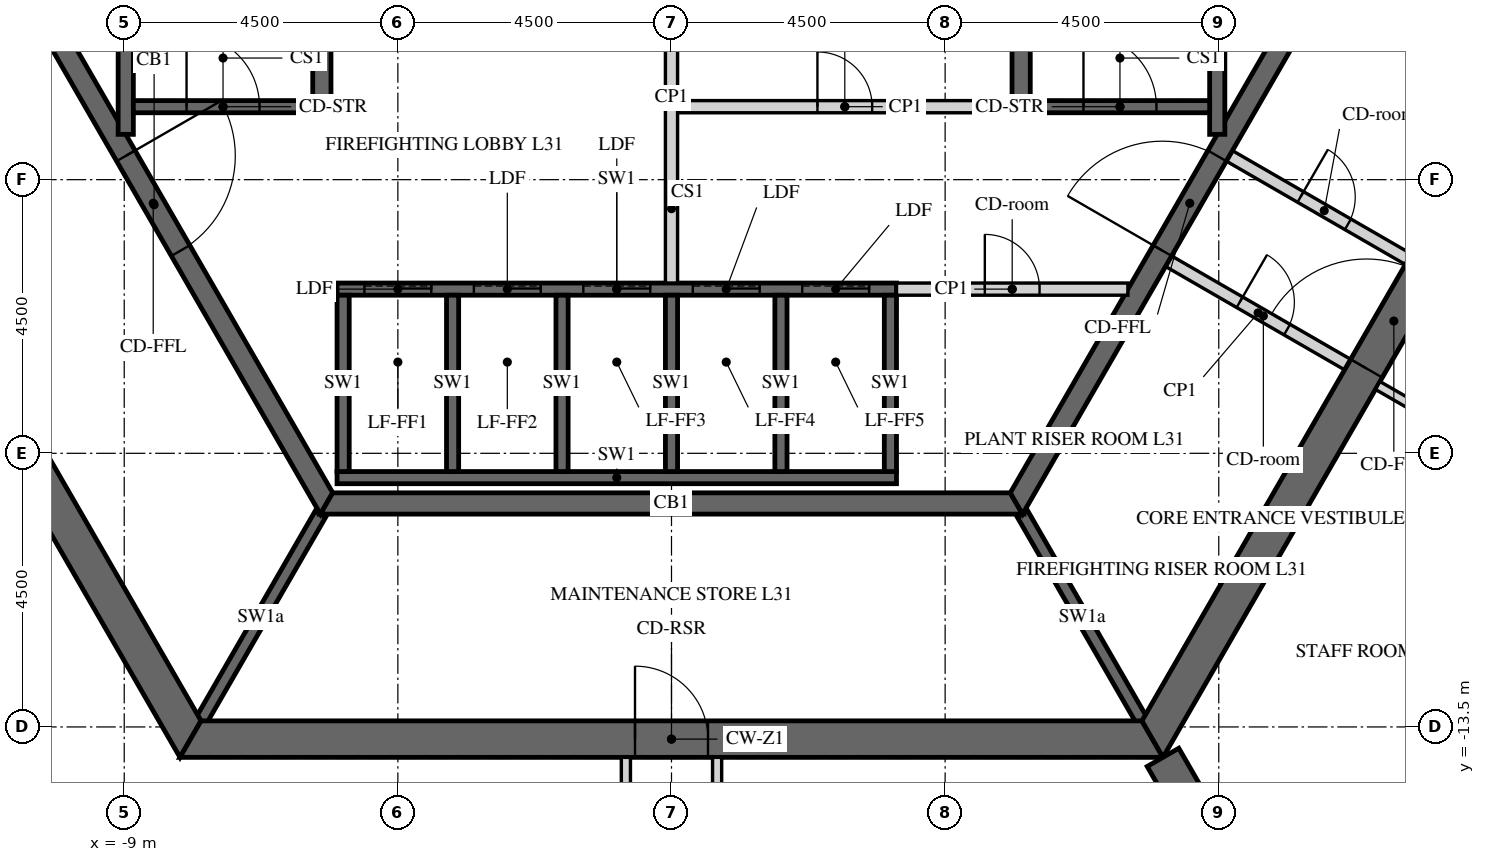
"""IFC4 building model, lengths in metres.
Left out: names, types, materials, properties, quantities, classifications, styles, units other than length and angle.
Written with IfcOpenShell. Run it as: python <this file> out.ifc"""

import sys

from ifc_helpers import new_model, si_unit, direction, frame, frame_2d, origin, place, context, subcontext, project, spatial, polyline, rectangle, outline, extrude, element, fill, save


model = new_model("IFC4")
c1 = context("Model", 3, precision=1e-05, world=origin(), true_north=direction((0.0, 1.0)))
c2 = subcontext(c1, "Body", "Model", "MODEL_VIEW")
j1 = project(units=[si_unit("LENGTHUNIT", "METRE"), si_unit("PLANEANGLEUNIT", "RADIAN")], contexts=[c1])
p1 = place(None, origin())
s1 = spatial("IfcSite", under=j1, at=p1, CompositionType="ELEMENT")
p2 = place(p1, origin())
s2 = spatial("IfcBuilding", under=s1, at=p2, CompositionType="ELEMENT")
p3 = place(p2, frame((0.0, 0.0, 135.0)))
s3 = spatial("IfcBuildingStorey", under=s2, at=p3, CompositionType="ELEMENT", Elevation=135.0)
p4 = place(p3, frame((-15.819, 0.0, -0.15), z_axis=(0.0, 0.0, 1.0), x_axis=(0.499999880136, -0.866025472988, 0.0)))
e1 = element("IfcWall", 1, at=p4, inside=s3, PredefinedType="SHEAR", context=c2, shape_type="SweptSolid", body=[
    extrude(outline(polyline([(-0.173, -0.3), (15.993, -0.3), (15.646, 0.3), (0.173, 0.3), (-0.173, -0.3)])), origin(), (0.0, 0.0, 1.0), 3.9),
])
p5 = place(p4, frame((6.981, 0.0, 0.15)))
e2 = element("IfcOpeningElement", 2, at=p5, cuts=e1, PredefinedType="OPENING", context=c2, shape_type="SweptSolid", body=[
    extrude(rectangle(XDim=1.8, YDim=2.4, at=frame_2d((0.9, 1.2))), frame((0.0, 0.31, 0.0), z_axis=(0.0, -1.0, 0.0), x_axis=(1.0, 0.0, 0.0)), (0.0, 0.0, 1.0), 0.62),
])
p6 = place(p3, frame((-7.91, -13.7, -0.15), z_axis=(0.0, 0.0, 1.0), x_axis=(1.0, 0.0, 0.0)))
e3 = element("IfcWall", 3, at=p6, inside=s3, PredefinedType="SHEAR", context=c2, shape_type="SweptSolid", body=[
    extrude(outline(polyline([(-0.173, -0.3), (15.993, -0.3), (15.646, 0.3), (0.173, 0.3), (-0.173, -0.3)])), origin(), (0.0, 0.0, 1.0), 3.9),
])
p7 = place(p6, frame((7.31, 0.0, 0.15)))
e4 = element("IfcOpeningElement", 4, at=p7, cuts=e3, PredefinedType="OPENING", context=c2, shape_type="SweptSolid", body=[
    extrude(rectangle(XDim=1.2, YDim=2.4, at=frame_2d((0.6, 1.2))), frame((0.0, 0.31, 0.0), z_axis=(0.0, -1.0, 0.0), x_axis=(1.0, 0.0, 0.0)), (0.0, 0.0, 1.0), 0.62),
])
p8 = place(p3, frame((7.91, -13.7, -0.15), z_axis=(0.0, 0.0, 1.0), x_axis=(0.499999880136, 0.866025472988, 0.0)))
e5 = element("IfcWall", 5, at=p8, inside=s3, PredefinedType="SHEAR", context=c2, shape_type="SweptSolid", body=[
    extrude(outline(polyline([(-0.173, -0.3), (15.993, -0.3), (15.646, 0.3), (0.173, 0.3), (-0.173, -0.3)])), origin(), (0.0, 0.0, 1.0), 3.9),
])
p9 = place(p8, frame((7.039, 0.0, 0.15)))
e6 = element("IfcOpeningElement", 6, at=p9, cuts=e5, PredefinedType="OPENING", context=c2, shape_type="SweptSolid", body=[
    extrude(rectangle(XDim=1.8, YDim=2.4, at=frame_2d((0.9, 1.2))), frame((0.0, 0.31, 0.0), z_axis=(0.0, -1.0, 0.0), x_axis=(1.0, 0.0, 0.0)), (0.0, 0.0, 1.0), 0.62),
])
p10 = place(p3, frame((8.083, -14.0, -0.15), z_axis=(0.0, 0.0, 1.0), x_axis=(0.499997680643, -0.866026742862, 0.0)))
e7 = element("IfcWall", 7, at=p10, inside=s3, PredefinedType="SHEAR", context=c2, shape_type="SweptSolid", body=[
    extrude(rectangle(XDim=16.509, YDim=0.6, at=frame_2d((8.254, 0.0))), origin(), (0.0, 0.0, 1.0), 3.9),
])
p11 = place(p10, frame((7.354, 0.0, 0.15)))
e8 = element("IfcOpeningElement", 8, at=p11, cuts=e7, PredefinedType="OPENING", context=c2, shape_type="SweptSolid", body=[
    extrude(rectangle(XDim=1.8, YDim=2.4, at=frame_2d((0.9, 1.2))), frame((0.0, 0.31, 0.0), z_axis=(0.0, -1.0, 0.0), x_axis=(1.0, 0.0, 0.0)), (0.0, 0.0, 1.0), 0.62),
])
p12 = place(p3, frame((-11.345, 0.0, -0.15), z_axis=(0.0, 0.0, 1.0), x_axis=(0.499995046907, -0.866028263435, 0.0)))
e9 = element("IfcWall", 9, at=p12, inside=s3, PredefinedType="SHEAR", context=c2, shape_type="SweptSolid", body=[
    extrude(outline(polyline([(-0.101, -0.175), (11.446, -0.175), (11.244, 0.175), (0.101, 0.175), (-0.101, -0.175)])), origin(), (0.0, 0.0, 1.0), 3.9),
])
p13 = place(p12, frame((4.744, 0.0, 0.15)))
e10 = element("IfcOpeningElement", 10, at=p13, cuts=e9, PredefinedType="OPENING", context=c2, shape_type="SweptSolid", body=[
    extrude(rectangle(XDim=1.8, YDim=2.4, at=frame_2d((0.9, 1.2))), frame((0.0, 0.185, 0.0), z_axis=(0.0, -1.0, 0.0), x_axis=(1.0, 0.0, 0.0)), (0.0, 0.0, 1.0), 0.37),
])
p14 = place(p3, frame((-5.673, -9.825, -0.15), z_axis=(0.0, 0.0, 1.0), x_axis=(1.0, 0.0, 0.0)))
e11 = element("IfcWall", 11, at=p14, inside=s3, PredefinedType="SHEAR", context=c2, shape_type="SweptSolid", body=[
    extrude(outline(polyline([(-0.101, -0.175), (11.446, -0.175), (11.244, 0.175), (0.101, 0.175), (-0.101, -0.175)])), origin(), (0.0, 0.0, 1.0), 3.9),
])
p15 = place(p3, frame((5.673, -9.825, -0.15), z_axis=(0.0, 0.0, 1.0), x_axis=(0.499995046907, 0.866028263435, 0.0)))
e12 = element("IfcWall", 12, at=p15, inside=s3, PredefinedType="SHEAR", context=c2, shape_type="SweptSolid", body=[
    extrude(outline(polyline([(-0.101, -0.175), (11.446, -0.175), (11.244, 0.175), (0.101, 0.175), (-0.101, -0.175)])), origin(), (0.0, 0.0, 1.0), 3.9),
])
p16 = place(p15, frame((4.801, 0.0, 0.15)))
e13 = element("IfcOpeningElement", 13, at=p16, cuts=e12, PredefinedType="OPENING", context=c2, shape_type="SweptSolid", body=[
    extrude(rectangle(XDim=1.8, YDim=2.4, at=frame_2d((0.9, 1.2))), frame((0.0, 0.185, 0.0), z_axis=(0.0, -1.0, 0.0), x_axis=(1.0, 0.0, 0.0)), (0.0, 0.0, 1.0), 0.37),
])
p17 = place(p3, frame((-5.5, -6.3, -0.25), z_axis=(0.0, 0.0, 1.0), x_axis=(1.0, 0.0, 0.0)))
e14 = element("IfcWall", 14, at=p17, inside=s3, PredefinedType="SHEAR", context=c2, shape_type="SweptSolid", body=[
    extrude(rectangle(XDim=9.2, YDim=0.2, at=frame_2d((4.6, 0.0))), origin(), (0.0, 0.0, 1.0), 3.9),
])
p18 = place(p17, frame((0.45, 0.0, 0.25)))
e15 = element("IfcOpeningElement", 15, at=p18, cuts=e14, PredefinedType="OPENING", context=c2, shape_type="SweptSolid", body=[
    extrude(rectangle(XDim=1.1, YDim=2.1, at=frame_2d((0.55, 1.05))), frame((0.0, 0.11, 0.0), z_axis=(0.0, -1.0, 0.0), x_axis=(1.0, 0.0, 0.0)), (0.0, 0.0, 1.0), 0.22),
])
p19 = place(p17, frame((2.25, 0.0, 0.25)))
e16 = element("IfcOpeningElement", 16, at=p19, cuts=e14, PredefinedType="OPENING", context=c2, shape_type="SweptSolid", body=[
    extrude(rectangle(XDim=1.1, YDim=2.1, at=frame_2d((0.55, 1.05))), frame((0.0, 0.11, 0.0), z_axis=(0.0, -1.0, 0.0), x_axis=(1.0, 0.0, 0.0)), (0.0, 0.0, 1.0), 0.22),
])
p20 = place(p17, frame((4.05, 0.0, 0.25)))
e17 = element("IfcOpeningElement", 17, at=p20, cuts=e14, PredefinedType="OPENING", context=c2, shape_type="SweptSolid", body=[
    extrude(rectangle(XDim=1.1, YDim=2.1, at=frame_2d((0.55, 1.05))), frame((0.0, 0.11, 0.0), z_axis=(0.0, -1.0, 0.0), x_axis=(1.0, 0.0, 0.0)), (0.0, 0.0, 1.0), 0.22),
])
p21 = place(p17, frame((5.85, 0.0, 0.25)))
e18 = element("IfcOpeningElement", 18, at=p21, cuts=e14, PredefinedType="OPENING", context=c2, shape_type="SweptSolid", body=[
    extrude(rectangle(XDim=1.1, YDim=2.1, at=frame_2d((0.55, 1.05))), frame((0.0, 0.11, 0.0), z_axis=(0.0, -1.0, 0.0), x_axis=(1.0, 0.0, 0.0)), (0.0, 0.0, 1.0), 0.22),
])
p22 = place(p17, frame((7.65, 0.0, 0.25)))
e19 = element("IfcOpeningElement", 19, at=p22, cuts=e14, PredefinedType="OPENING", context=c2, shape_type="SweptSolid", body=[
    extrude(rectangle(XDim=1.1, YDim=2.1, at=frame_2d((0.55, 1.05))), frame((0.0, 0.11, 0.0), z_axis=(0.0, -1.0, 0.0), x_axis=(1.0, 0.0, 0.0)), (0.0, 0.0, 1.0), 0.22),
])
p23 = place(p3, frame((-5.5, -9.4, -0.25), z_axis=(0.0, 0.0, 1.0), x_axis=(1.0, 0.0, 0.0)))
e20 = element("IfcWall", 20, at=p23, inside=s3, PredefinedType="SHEAR", context=c2, shape_type="SweptSolid", body=[
    extrude(rectangle(XDim=9.2, YDim=0.2, at=frame_2d((4.6, 0.0))), origin(), (0.0, 0.0, 1.0), 3.9),
])
for number, where, z_axis, x_axis in (
    (21, (-5.4, -9.3, -0.25), (0.0, 0.0, 1.0), (0.0, 1.0, 0.0)),
    (22, (-3.6, -9.3, -0.25), (0.0, 0.0, 1.0), (0.0, 1.0, 0.0)),
    (23, (-1.8, -9.3, -0.25), (0.0, 0.0, 1.0), (0.0, 1.0, 0.0)),
    (24, (0.0, -9.3, -0.25), (0.0, 0.0, 1.0), (0.0, 1.0, 0.0)),
    (25, (1.8, -9.3, -0.25), (0.0, 0.0, 1.0), (0.0, 1.0, 0.0)),
    (26, (3.6, -9.3, -0.25), (0.0, 0.0, 1.0), (0.0, 1.0, 0.0)),
):
    element("IfcWall", number, at=place(p3, frame(where, z_axis=z_axis, x_axis=x_axis)), inside=s3, PredefinedType="SHEAR", context=c2, shape_type="SweptSolid", body=[
        extrude(rectangle(XDim=2.9, YDim=0.2, at=frame_2d((1.45, 0.0))), origin(), (0.0, 0.0, 1.0), 3.9),
    ])
p24 = place(p3, frame((0.1, -3.3, 0.0), z_axis=(0.0, 0.0, 1.0), x_axis=(1.0, 0.0, 0.0)))
e27 = element("IfcWall", 27, at=p24, inside=s3, PredefinedType="PARTITIONING", context=c2, shape_type="SweptSolid", body=[
    extrude(rectangle(XDim=5.5, YDim=0.2, at=frame_2d((2.75, 0.0))), origin(), (0.0, 0.0, 1.0), 3.65),
])
p25 = place(p24, frame((2.3, 0.0, 0.0)))
e28 = element("IfcOpeningElement", 28, at=p25, cuts=e27, PredefinedType="OPENING", context=c2, shape_type="SweptSolid", body=[
    extrude(rectangle(XDim=0.9, YDim=2.1, at=frame_2d((0.45, 1.05))), frame((0.0, 0.11, 0.0), z_axis=(0.0, -1.0, 0.0), x_axis=(1.0, 0.0, 0.0)), (0.0, 0.0, 1.0), 0.22),
])
p26 = place(p3, frame((0.0, -6.2, 0.0), z_axis=(0.0, 0.0, 1.0), x_axis=(0.0, 1.0, 0.0)))
e29 = element("IfcWall", 29, at=p26, inside=s3, PredefinedType="PARTITIONING", context=c2, shape_type="SweptSolid", body=[
    extrude(rectangle(XDim=6.1, YDim=0.2, at=frame_2d((3.05, 0.0))), origin(), (0.0, 0.0, 1.0), 3.65),
])
p27 = place(p3, frame((3.7, -6.3, 0.0), z_axis=(0.0, 0.0, 1.0), x_axis=(1.0, 0.0, 0.0)))
e30 = element("IfcWall", 30, at=p27, inside=s3, PredefinedType="PARTITIONING", context=c2, shape_type="SweptSolid", body=[
    extrude(rectangle(XDim=3.806, YDim=0.2, at=frame_2d((1.903, 0.0))), origin(), (0.0, 0.0, 1.0), 3.65),
])
p28 = place(p27, frame((1.453, 0.0, 0.0)))
e31 = element("IfcOpeningElement", 31, at=p28, cuts=e30, PredefinedType="OPENING", context=c2, shape_type="SweptSolid", body=[
    extrude(rectangle(XDim=0.9, YDim=2.1, at=frame_2d((0.45, 1.05))), frame((0.0, 0.11, 0.0), z_axis=(0.0, -1.0, 0.0), x_axis=(1.0, 0.0, 0.0)), (0.0, 0.0, 1.0), 0.22),
])
for number, where, z_axis, x_axis in (
    (32, (-5.773, -10.0, -0.15), (0.0, 0.0, 1.0), (-0.5, -0.866, 0.0)),
    (33, (5.773, -10.0, -0.15), (0.0, 0.0, 1.0), (0.5, -0.866, 0.0)),
):
    element("IfcWall", number, at=place(p3, frame(where, z_axis=z_axis, x_axis=x_axis)), inside=s3, PredefinedType="SHEAR", context=c2, shape_type="SweptSolid", body=[
        extrude(rectangle(XDim=3.926, YDim=0.2, at=frame_2d((1.963, 0.0))), origin(), (0.0, 0.0, 1.0), 3.9),
    ])
p29 = place(p3, frame((9.175, -4.109, 0.0), z_axis=(0.0, 0.0, 1.0), x_axis=(0.865989465428, -0.500062241894, 0.0)))
e34 = element("IfcWall", 34, at=p29, inside=s3, PredefinedType="PARTITIONING", context=c2, shape_type="SweptSolid", body=[
    extrude(rectangle(XDim=3.4, YDim=0.2, at=frame_2d((1.7, 0.0))), origin(), (0.0, 0.0, 1.0), 3.65),
])
p30 = place(p29, frame((1.351, 0.0, 0.0)))
e35 = element("IfcOpeningElement", 35, at=p30, cuts=e34, PredefinedType="OPENING", context=c2, shape_type="SweptSolid", body=[
    extrude(rectangle(XDim=0.9, YDim=2.1, at=frame_2d((0.45, 1.05))), frame((0.0, 0.11, 0.0), z_axis=(0.0, -1.0, 0.0), x_axis=(1.0, 0.0, 0.0)), (0.0, 0.0, 1.0), 0.22),
])
p31 = place(p3, frame((8.175, -5.841, 0.0), z_axis=(0.0, 0.0, 1.0), x_axis=(0.866020560687, -0.500008388397, 0.0)))
e36 = element("IfcWall", 36, at=p31, inside=s3, PredefinedType="PARTITIONING", context=c2, shape_type="SweptSolid", body=[
    extrude(rectangle(XDim=3.4, YDim=0.2, at=frame_2d((1.7, 0.0))), origin(), (0.0, 0.0, 1.0), 3.65),
])
p32 = place(p31, frame((1.35, 0.0, 0.0)))
e37 = element("IfcOpeningElement", 37, at=p32, cuts=e36, PredefinedType="OPENING", context=c2, shape_type="SweptSolid", body=[
    extrude(rectangle(XDim=0.9, YDim=2.1, at=frame_2d((0.45, 1.05))), frame((0.0, 0.11, 0.0), z_axis=(0.0, -1.0, 0.0), x_axis=(1.0, 0.0, 0.0)), (0.0, 0.0, 1.0), 0.22),
])
p33 = place(p3, frame((5.75, -3.4, -0.25), z_axis=(0.0, 0.0, 1.0), x_axis=(0.0, 1.0, 0.0)))
e38 = element("IfcWall", 38, at=p33, inside=s3, PredefinedType="SHEAR", context=c2, shape_type="SweptSolid", body=[
    extrude(rectangle(XDim=6.8, YDim=0.3, at=frame_2d((3.4, 0.0))), origin(), (0.0, 0.0, 1.0), 3.9),
])
p34 = place(p3, frame((8.975, -3.755, -0.25), z_axis=(0.0, 0.0, 1.0), x_axis=(0.0, 1.0, 0.0)))
e39 = element("IfcWall", 39, at=p34, inside=s3, PredefinedType="SHEAR", context=c2, shape_type="SweptSolid", body=[
    extrude(rectangle(XDim=7.51, YDim=0.25, at=frame_2d((3.755, 0.0))), origin(), (0.0, 0.0, 1.0), 3.9),
])
p35 = place(p3, frame((5.9, -3.3, -0.25), z_axis=(0.0, 0.0, 1.0), x_axis=(1.0, 0.0, 0.0)))
e40 = element("IfcWall", 40, at=p35, inside=s3, PredefinedType="SHEAR", context=c2, shape_type="SweptSolid", body=[
    extrude(rectangle(XDim=2.95, YDim=0.2, at=frame_2d((1.475, 0.0))), origin(), (0.0, 0.0, 1.0), 3.9),
])
p36 = place(p35, frame((0.875, 0.0, 0.25)))
e41 = element("IfcOpeningElement", 41, at=p36, cuts=e40, PredefinedType="OPENING", context=c2, shape_type="SweptSolid", body=[
    extrude(rectangle(XDim=1.2, YDim=2.4, at=frame_2d((0.6, 1.2))), frame((0.0, 0.11, 0.0), z_axis=(0.0, -1.0, 0.0), x_axis=(1.0, 0.0, 0.0)), (0.0, 0.0, 1.0), 0.22),
])
p37 = place(p3, frame((-5.75, -3.4, -0.25), z_axis=(0.0, 0.0, 1.0), x_axis=(0.0, 1.0, 0.0)))
e42 = element("IfcWall", 42, at=p37, inside=s3, PredefinedType="SHEAR", context=c2, shape_type="SweptSolid", body=[
    extrude(rectangle(XDim=6.8, YDim=0.3, at=frame_2d((3.4, 0.0))), origin(), (0.0, 0.0, 1.0), 3.9),
])
p38 = place(p3, frame((-8.975, -3.755, -0.25), z_axis=(0.0, 0.0, 1.0), x_axis=(0.0, 1.0, 0.0)))
e43 = element("IfcWall", 43, at=p38, inside=s3, PredefinedType="SHEAR", context=c2, shape_type="SweptSolid", body=[
    extrude(rectangle(XDim=7.51, YDim=0.25, at=frame_2d((3.755, 0.0))), origin(), (0.0, 0.0, 1.0), 3.9),
])
p39 = place(p3, frame((-8.85, -3.3, -0.25), z_axis=(0.0, 0.0, 1.0), x_axis=(1.0, 0.0, 0.0)))
e44 = element("IfcWall", 44, at=p39, inside=s3, PredefinedType="SHEAR", context=c2, shape_type="SweptSolid", body=[
    extrude(rectangle(XDim=2.95, YDim=0.2, at=frame_2d((1.475, 0.0))), origin(), (0.0, 0.0, 1.0), 3.9),
])
p40 = place(p39, frame((0.875, 0.0, 0.25)))
e45 = element("IfcOpeningElement", 45, at=p40, cuts=e44, PredefinedType="OPENING", context=c2, shape_type="SweptSolid", body=[
    extrude(rectangle(XDim=1.2, YDim=2.4, at=frame_2d((0.6, 1.2))), frame((0.0, 0.11, 0.0), z_axis=(0.0, -1.0, 0.0), x_axis=(1.0, 0.0, 0.0)), (0.0, 0.0, 1.0), 0.22),
])
p41 = place(p3, frame((-0.75, -14.0, 0.0), z_axis=(0.0, 0.0, 1.0), x_axis=(0.0, -1.0, 0.0)))
e46 = element("IfcWall", 46, at=p41, inside=s3, PredefinedType="PARTITIONING", context=c2, shape_type="SweptSolid", body=[
    extrude(rectangle(XDim=5.951, YDim=0.15, at=frame_2d((2.976, 0.0))), origin(), (0.0, 0.0, 1.0), 2.838),
])
p42 = place(p3, frame((0.75, -19.771, 0.0), z_axis=(0.0, 0.0, 1.0), x_axis=(0.0, 1.0, 0.0)))
e47 = element("IfcWall", 47, at=p42, inside=s3, PredefinedType="PARTITIONING", context=c2, shape_type="SweptSolid", body=[
    extrude(rectangle(XDim=5.771, YDim=0.15, at=frame_2d((2.885, 0.0))), origin(), (0.0, 0.0, 1.0), 2.838),
])
p43 = place(p3, frame((11.614, -7.884, 0.0), z_axis=(0.0, 0.0, 1.0), x_axis=(0.866018092707, -0.500012662943, 0.0)))
e48 = element("IfcWall", 48, at=p43, inside=s3, PredefinedType="PARTITIONING", context=c2, shape_type="SweptSolid", body=[
    extrude(rectangle(XDim=5.85, YDim=0.15, at=frame_2d((2.925, 0.0))), origin(), (0.0, 0.0, 1.0), 2.838),
])
p44 = place(p9, origin())
e49 = element("IfcDoor", 49, at=p44, inside=s3, OperationType="DOUBLE_DOOR_SINGLE_SWING", PredefinedType="DOOR", context=c2, shape_type="SweptSolid", body=[
    extrude(rectangle(XDim=1.8, YDim=2.4, at=frame_2d((0.9, 1.2))), frame((0.0, 0.025, 0.0), z_axis=(0.0, -1.0, 0.0), x_axis=(1.0, 0.0, 0.0)), (0.0, 0.0, 1.0), 0.05),
])
fill(e6, e49)
p45 = place(p7, origin())
e50 = element("IfcDoor", 50, at=p45, inside=s3, OperationType="SINGLE_SWING_LEFT", PredefinedType="DOOR", context=c2, shape_type="SweptSolid", body=[
    extrude(rectangle(XDim=1.2, YDim=2.4, at=frame_2d((0.6, 1.2))), frame((0.0, 0.025, 0.0), z_axis=(0.0, -1.0, 0.0), x_axis=(1.0, 0.0, 0.0)), (0.0, 0.0, 1.0), 0.05),
])
fill(e4, e50)
p46 = place(p13, origin())
e51 = element("IfcDoor", 51, at=p46, inside=s3, OperationType="DOUBLE_DOOR_SINGLE_SWING", PredefinedType="DOOR", context=c2, shape_type="SweptSolid", body=[
    extrude(rectangle(XDim=1.8, YDim=2.4, at=frame_2d((0.9, 1.2))), frame((0.0, 0.025, 0.0), z_axis=(0.0, -1.0, 0.0), x_axis=(1.0, 0.0, 0.0)), (0.0, 0.0, 1.0), 0.05),
])
fill(e10, e51)
p47 = place(p16, origin())
e52 = element("IfcDoor", 52, at=p47, inside=s3, OperationType="DOUBLE_DOOR_SINGLE_SWING", PredefinedType="DOOR", context=c2, shape_type="SweptSolid", body=[
    extrude(rectangle(XDim=1.8, YDim=2.4, at=frame_2d((0.9, 1.2))), frame((0.0, 0.025, 0.0), z_axis=(0.0, -1.0, 0.0), x_axis=(1.0, 0.0, 0.0)), (0.0, 0.0, 1.0), 0.05),
])
fill(e13, e52)
p48 = place(p25, origin())
e53 = element("IfcDoor", 53, at=p48, inside=s3, OperationType="SINGLE_SWING_LEFT", PredefinedType="DOOR", context=c2, shape_type="SweptSolid", body=[
    extrude(rectangle(XDim=0.9, YDim=2.1, at=frame_2d((0.45, 1.05))), frame((0.0, 0.025, 0.0), z_axis=(0.0, -1.0, 0.0), x_axis=(1.0, 0.0, 0.0)), (0.0, 0.0, 1.0), 0.05),
])
fill(e28, e53)
p49 = place(p28, origin())
e54 = element("IfcDoor", 54, at=p49, inside=s3, OperationType="SINGLE_SWING_LEFT", PredefinedType="DOOR", context=c2, shape_type="SweptSolid", body=[
    extrude(rectangle(XDim=0.9, YDim=2.1, at=frame_2d((0.45, 1.05))), frame((0.0, 0.025, 0.0), z_axis=(0.0, -1.0, 0.0), x_axis=(1.0, 0.0, 0.0)), (0.0, 0.0, 1.0), 0.05),
])
fill(e31, e54)
p50 = place(p30, origin())
e55 = element("IfcDoor", 55, at=p50, inside=s3, OperationType="SINGLE_SWING_LEFT", PredefinedType="DOOR", context=c2, shape_type="SweptSolid", body=[
    extrude(rectangle(XDim=0.9, YDim=2.1, at=frame_2d((0.45, 1.05))), frame((0.0, 0.025, 0.0), z_axis=(0.0, -1.0, 0.0), x_axis=(1.0, 0.0, 0.0)), (0.0, 0.0, 1.0), 0.05),
])
fill(e35, e55)
p51 = place(p32, origin())
e56 = element("IfcDoor", 56, at=p51, inside=s3, OperationType="SINGLE_SWING_LEFT", PredefinedType="DOOR", context=c2, shape_type="SweptSolid", body=[
    extrude(rectangle(XDim=0.9, YDim=2.1, at=frame_2d((0.45, 1.05))), frame((0.0, 0.025, 0.0), z_axis=(0.0, -1.0, 0.0), x_axis=(1.0, 0.0, 0.0)), (0.0, 0.0, 1.0), 0.05),
])
fill(e37, e56)
p52 = place(p36, origin())
e57 = element("IfcDoor", 57, at=p52, inside=s3, OperationType="SINGLE_SWING_LEFT", PredefinedType="DOOR", context=c2, shape_type="SweptSolid", body=[
    extrude(rectangle(XDim=1.2, YDim=2.4, at=frame_2d((0.6, 1.2))), frame((0.0, 0.025, 0.0), z_axis=(0.0, -1.0, 0.0), x_axis=(1.0, 0.0, 0.0)), (0.0, 0.0, 1.0), 0.05),
])
fill(e41, e57)
p53 = place(p40, origin())
e58 = element("IfcDoor", 58, at=p53, inside=s3, OperationType="SINGLE_SWING_LEFT", PredefinedType="DOOR", context=c2, shape_type="SweptSolid", body=[
    extrude(rectangle(XDim=1.2, YDim=2.4, at=frame_2d((0.6, 1.2))), frame((0.0, 0.025, 0.0), z_axis=(0.0, -1.0, 0.0), x_axis=(1.0, 0.0, 0.0)), (0.0, 0.0, 1.0), 0.05),
])
fill(e45, e58)
p54 = place(p18, origin())
e59 = element("IfcDoor", 59, at=p54, inside=s3, OperationType="SLIDING_TO_LEFT", PredefinedType="DOOR", context=c2, shape_type="SweptSolid", body=[
    extrude(rectangle(XDim=1.1, YDim=2.1, at=frame_2d((0.55, 1.05))), frame((0.0, 0.025, 0.0), z_axis=(0.0, -1.0, 0.0), x_axis=(1.0, 0.0, 0.0)), (0.0, 0.0, 1.0), 0.05),
])
fill(e15, e59)
p55 = place(p19, origin())
e60 = element("IfcDoor", 60, at=p55, inside=s3, OperationType="SLIDING_TO_LEFT", PredefinedType="DOOR", context=c2, shape_type="SweptSolid", body=[
    extrude(rectangle(XDim=1.1, YDim=2.1, at=frame_2d((0.55, 1.05))), frame((0.0, 0.025, 0.0), z_axis=(0.0, -1.0, 0.0), x_axis=(1.0, 0.0, 0.0)), (0.0, 0.0, 1.0), 0.05),
])
fill(e16, e60)
p56 = place(p20, origin())
e61 = element("IfcDoor", 61, at=p56, inside=s3, OperationType="SLIDING_TO_LEFT", PredefinedType="DOOR", context=c2, shape_type="SweptSolid", body=[
    extrude(rectangle(XDim=1.1, YDim=2.1, at=frame_2d((0.55, 1.05))), frame((0.0, 0.025, 0.0), z_axis=(0.0, -1.0, 0.0), x_axis=(1.0, 0.0, 0.0)), (0.0, 0.0, 1.0), 0.05),
])
fill(e17, e61)
p57 = place(p21, origin())
e62 = element("IfcDoor", 62, at=p57, inside=s3, OperationType="SLIDING_TO_LEFT", PredefinedType="DOOR", context=c2, shape_type="SweptSolid", body=[
    extrude(rectangle(XDim=1.1, YDim=2.1, at=frame_2d((0.55, 1.05))), frame((0.0, 0.025, 0.0), z_axis=(0.0, -1.0, 0.0), x_axis=(1.0, 0.0, 0.0)), (0.0, 0.0, 1.0), 0.05),
])
fill(e18, e62)
p58 = place(p22, origin())
e63 = element("IfcDoor", 63, at=p58, inside=s3, OperationType="SLIDING_TO_LEFT", PredefinedType="DOOR", context=c2, shape_type="SweptSolid", body=[
    extrude(rectangle(XDim=1.1, YDim=2.1, at=frame_2d((0.55, 1.05))), frame((0.0, 0.025, 0.0), z_axis=(0.0, -1.0, 0.0), x_axis=(1.0, 0.0, 0.0)), (0.0, 0.0, 1.0), 0.05),
])
fill(e19, e63)
save(model, sys.argv[1])
